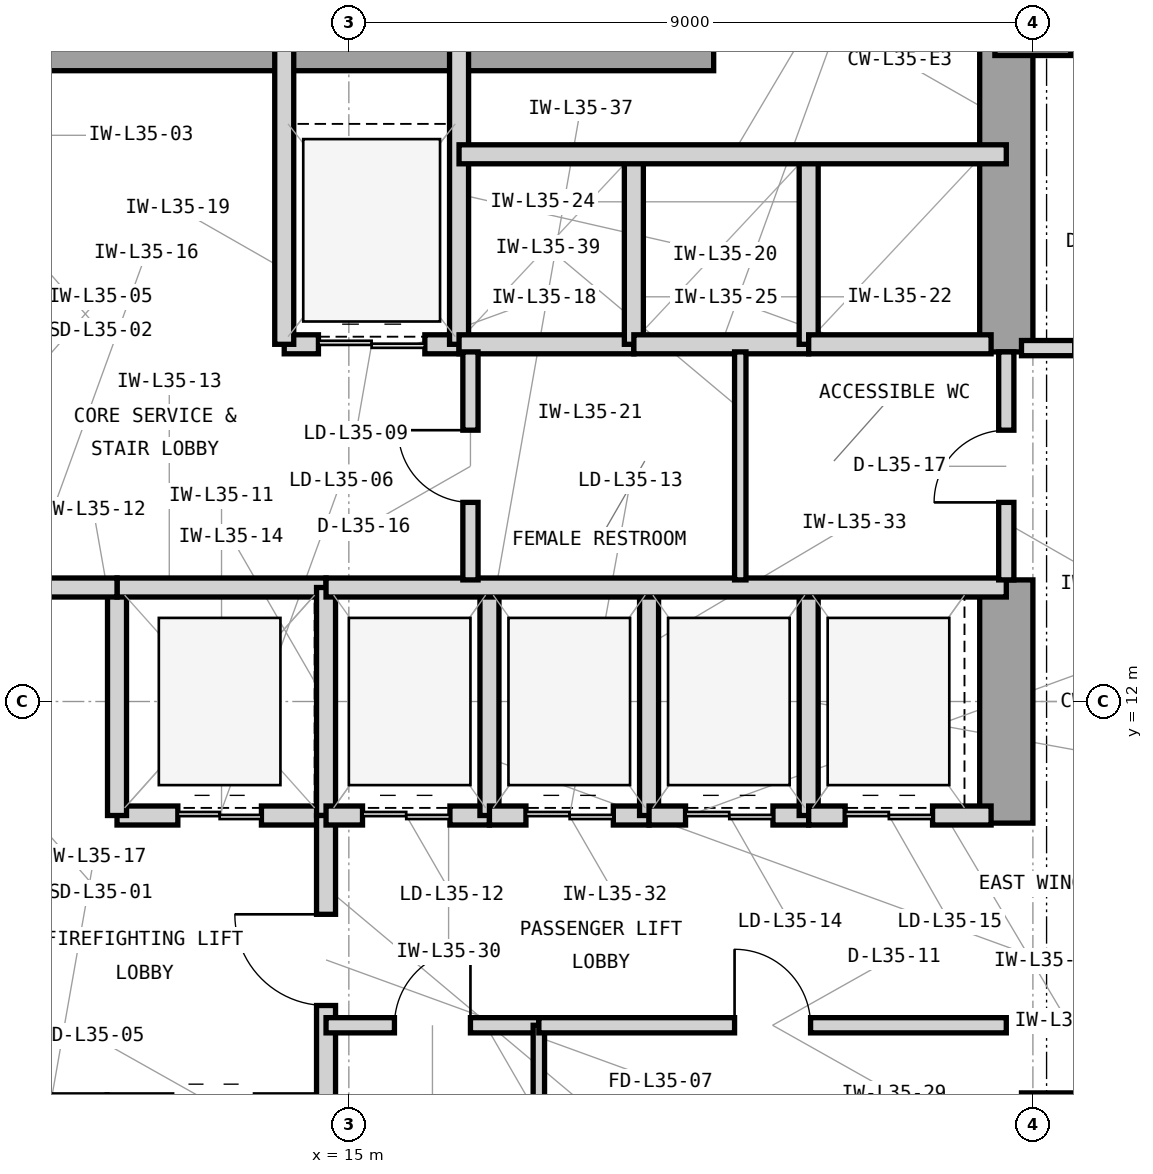
"""IFC4 building model, lengths in metres.
Left out: names, types, materials, properties, quantities, classifications, styles, units other than length and angle.
Written with IfcOpenShell. Run it as: python <this file> out.ifc"""

import sys

from ifc_helpers import new_model, si_unit, direction, frame, frame_2d, origin, origin_2d, place, context, subcontext, project, spatial, rectangle, extrude, element, fill, save


model = new_model("IFC4")
c1 = context("Model", 3, precision=1e-05, world=origin(), true_north=direction((0.0, 1.0)))
c2 = subcontext(c1, "Body", "Model", "MODEL_VIEW")
j1 = project(units=[si_unit("LENGTHUNIT", "METRE"), si_unit("PLANEANGLEUNIT", "RADIAN")], contexts=[c1])
p1 = place(None, origin())
s1 = spatial("IfcSite", under=j1, at=p1, CompositionType="ELEMENT")
p2 = place(p1, origin())
s2 = spatial("IfcBuilding", under=s1, at=p2, CompositionType="ELEMENT")
p3 = place(p2, frame((0.0, 0.0, 147.9)))
s3 = spatial("IfcBuildingStorey", under=s2, at=p3, CompositionType="ELEMENT", Elevation=147.9)
p4 = place(p3, frame((7.475, 20.65, 0.0), z_axis=(0.0, 0.0, 1.0), x_axis=(1.0, 0.0, 0.0)))
e1 = element("IfcWall", 1, at=p4, inside=s3, PredefinedType="SHEAR", context=c2, shape_type="SweptSolid", body=[
    extrude(rectangle(XDim=12.325, YDim=0.7, at=frame_2d((6.163, 0.0))), origin(), (0.0, 0.0, 1.0), 3.9),
])
p5 = place(p3, frame((23.65, 10.4, 0.0), z_axis=(0.0, 0.0, 1.0), x_axis=(0.0, 1.0, 0.0)))
e2 = element("IfcWall", 2, at=p5, inside=s3, PredefinedType="SHEAR", context=c2, shape_type="SweptSolid", body=[
    extrude(rectangle(XDim=3.2, YDim=0.7, at=frame_2d((1.6, 0.0))), origin(), (0.0, 0.0, 1.0), 3.9),
])
p6 = place(p3, frame((23.65, 16.6, 0.0), z_axis=(0.0, 0.0, 1.0), x_axis=(0.0, 1.0, 0.0)))
e3 = element("IfcWall", 3, at=p6, inside=s3, PredefinedType="SHEAR", context=c2, shape_type="SweptSolid", body=[
    extrude(rectangle(XDim=4.05, YDim=0.7, at=frame_2d((2.025, 0.0))), origin(), (0.0, 0.0, 1.0), 3.9),
])
p7 = place(p3, frame((24.0, 21.0, 0.0), z_axis=(0.0, 0.0, 1.0), x_axis=(1.0, 0.0, 0.0)))
e4 = element("IfcColumn", 4, at=p7, inside=s3, PredefinedType="COLUMN", context=c2, shape_type="SweptSolid", body=[
    extrude(rectangle(XDim=1.0, YDim=1.0, at=origin_2d()), origin(), (0.0, 0.0, 1.0), 3.9),
])
p8 = place(p3, frame((11.95, 10.5, 0.0), z_axis=(0.0, 0.0, 1.0), x_axis=(1.0, 0.0, 0.0)))
e5 = element("IfcWall", 5, at=p8, inside=s3, PredefinedType="PARTITIONING", context=c2, shape_type="SweptSolid", body=[
    extrude(rectangle(XDim=2.75, YDim=0.25, at=frame_2d((1.375, 0.0))), origin(), (0.0, 0.0, 1.0), 3.233),
])
p9 = place(p8, frame((0.8, 0.0, 0.0)))
e6 = element("IfcOpeningElement", 6, at=p9, cuts=e5, PredefinedType="OPENING", context=c2, shape_type="SweptSolid", body=[
    extrude(rectangle(XDim=1.1, YDim=2.25, at=frame_2d((0.55, 1.125))), frame((0.0, 0.135, 0.0), z_axis=(0.0, -1.0, 0.0), x_axis=(1.0, 0.0, 0.0)), (0.0, 0.0, 1.0), 0.27),
])
p10 = place(p3, frame((11.95, 10.5, 0.0), z_axis=(0.0, 0.0, 1.0), x_axis=(0.0, 1.0, 0.0)))
e7 = element("IfcWall", 7, at=p10, inside=s3, PredefinedType="PARTITIONING", context=c2, shape_type="SweptSolid", body=[
    extrude(rectangle(XDim=3.0, YDim=0.25, at=frame_2d((1.5, 0.0))), origin(), (0.0, 0.0, 1.0), 3.69),
])
p11 = place(p3, frame((11.95, 13.5, 0.0), z_axis=(0.0, 0.0, 1.0), x_axis=(1.0, 0.0, 0.0)))
e8 = element("IfcWall", 8, at=p11, inside=s3, PredefinedType="PARTITIONING", context=c2, shape_type="SweptSolid", body=[
    extrude(rectangle(XDim=2.75, YDim=0.25, at=frame_2d((1.375, 0.0))), origin(), (0.0, 0.0, 1.0), 3.233),
])
p12 = place(p3, frame((14.7, 10.5, 0.0), z_axis=(0.0, 0.0, 1.0), x_axis=(0.0, 1.0, 0.0)))
e9 = element("IfcWall", 9, at=p12, inside=s3, PredefinedType="PARTITIONING", context=c2, shape_type="SweptSolid", body=[
    extrude(rectangle(XDim=3.0, YDim=0.25, at=frame_2d((1.5, 0.0))), origin(), (0.0, 0.0, 1.0), 3.69),
])
p13 = place(p3, frame((14.7, 6.7, 0.0), z_axis=(0.0, 0.0, 1.0), x_axis=(0.0, 1.0, 0.0)))
e10 = element("IfcWall", 10, at=p13, inside=s3, PredefinedType="PARTITIONING", context=c2, shape_type="SweptSolid", body=[
    extrude(rectangle(XDim=3.8, YDim=0.25, at=frame_2d((1.9, 0.0))), origin(), (0.0, 0.0, 1.0), 3.69),
])
p14 = place(p13, frame((1.3, 0.0, 0.0)))
e11 = element("IfcOpeningElement", 11, at=p14, cuts=e10, PredefinedType="OPENING", context=c2, shape_type="SweptSolid", body=[
    extrude(rectangle(XDim=1.2, YDim=2.2, at=frame_2d((0.6, 1.1))), frame((0.0, 0.135, 0.0), z_axis=(0.0, -1.0, 0.0), x_axis=(1.0, 0.0, 0.0)), (0.0, 0.0, 1.0), 0.27),
])
p15 = place(p3, frame((10.33, 13.5, 0.0), z_axis=(0.0, 0.0, 1.0), x_axis=(1.0, 0.0, 0.0)))
e12 = element("IfcWall", 12, at=p15, inside=s3, PredefinedType="PARTITIONING", context=c2, shape_type="SweptSolid", body=[
    extrude(rectangle(XDim=1.62, YDim=0.25, at=frame_2d((0.81, 0.0))), origin(), (0.0, 0.0, 1.0), 3.233),
])
p16 = place(p3, frame((14.15, 16.7, 0.0), z_axis=(0.0, 0.0, 1.0), x_axis=(1.0, 0.0, 0.0)))
e13 = element("IfcWall", 13, at=p16, inside=s3, PredefinedType="PARTITIONING", context=c2, shape_type="SweptSolid", body=[
    extrude(rectangle(XDim=2.3, YDim=0.25, at=frame_2d((1.15, 0.0))), origin(), (0.0, 0.0, 1.0), 3.233),
])
p17 = place(p16, frame((0.45, 0.0, 0.0)))
e14 = element("IfcOpeningElement", 14, at=p17, cuts=e13, PredefinedType="OPENING", context=c2, shape_type="SweptSolid", body=[
    extrude(rectangle(XDim=1.4, YDim=2.35, at=frame_2d((0.7, 1.175))), frame((0.0, 0.135, 0.0), z_axis=(0.0, -1.0, 0.0), x_axis=(1.0, 0.0, 0.0)), (0.0, 0.0, 1.0), 0.27),
])
for number, where, z_axis, x_axis in (
    (15, (14.15, 16.7, 0.0), (0.0, 0.0, 1.0), (0.0, 1.0, 0.0)),
    (16, (16.45, 16.7, 0.0), (0.0, 0.0, 1.0), (0.0, 1.0, 0.0)),
):
    element("IfcWall", number, at=place(p3, frame(where, z_axis=z_axis, x_axis=x_axis)), inside=s3, PredefinedType="PARTITIONING", context=c2, shape_type="SweptSolid", body=[
        extrude(rectangle(XDim=3.95, YDim=0.25, at=frame_2d((1.975, 0.0))), origin(), (0.0, 0.0, 1.0), 3.69),
    ])
p18 = place(p3, frame((16.45, 16.7, 0.0), z_axis=(0.0, 0.0, 1.0), x_axis=(1.0, 0.0, 0.0)))
e17 = element("IfcWall", 17, at=p18, inside=s3, PredefinedType="PARTITIONING", context=c2, shape_type="SweptSolid", body=[
    extrude(rectangle(XDim=2.3, YDim=0.25, at=frame_2d((1.15, 0.0))), origin(), (0.0, 0.0, 1.0), 3.233),
])
p19 = place(p3, frame((18.75, 16.7, 0.0), z_axis=(0.0, 0.0, 1.0), x_axis=(0.0, 1.0, 0.0)))
e18 = element("IfcWall", 18, at=p19, inside=s3, PredefinedType="PARTITIONING", context=c2, shape_type="SweptSolid", body=[
    extrude(rectangle(XDim=2.5, YDim=0.25, at=frame_2d((1.25, 0.0))), origin(), (0.0, 0.0, 1.0), 3.69),
])
p20 = place(p3, frame((18.75, 16.7, 0.0), z_axis=(0.0, 0.0, 1.0), x_axis=(1.0, 0.0, 0.0)))
e19 = element("IfcWall", 19, at=p20, inside=s3, PredefinedType="PARTITIONING", context=c2, shape_type="SweptSolid", body=[
    extrude(rectangle(XDim=2.3, YDim=0.25, at=frame_2d((1.15, 0.0))), origin(), (0.0, 0.0, 1.0), 3.233),
])
p21 = place(p3, frame((21.05, 16.7, 0.0), z_axis=(0.0, 0.0, 1.0), x_axis=(0.0, 1.0, 0.0)))
e20 = element("IfcWall", 20, at=p21, inside=s3, PredefinedType="PARTITIONING", context=c2, shape_type="SweptSolid", body=[
    extrude(rectangle(XDim=2.5, YDim=0.25, at=frame_2d((1.25, 0.0))), origin(), (0.0, 0.0, 1.0), 3.69),
])
p22 = place(p3, frame((21.05, 16.7, 0.0), z_axis=(0.0, 0.0, 1.0), x_axis=(1.0, 0.0, 0.0)))
e21 = element("IfcWall", 21, at=p22, inside=s3, PredefinedType="PARTITIONING", context=c2, shape_type="SweptSolid", body=[
    extrude(rectangle(XDim=2.4, YDim=0.25, at=frame_2d((1.2, 0.0))), origin(), (0.0, 0.0, 1.0), 3.233),
])
p23 = place(p3, frame((16.45, 19.2, 0.0), z_axis=(0.0, 0.0, 1.0), x_axis=(1.0, 0.0, 0.0)))
e22 = element("IfcWall", 22, at=p23, inside=s3, PredefinedType="PARTITIONING", context=c2, shape_type="SweptSolid", body=[
    extrude(rectangle(XDim=7.2, YDim=0.25, at=frame_2d((3.6, 0.0))), origin(), (0.0, 0.0, 1.0), 3.69),
])
p24 = place(p3, frame((14.7, 7.74, 0.0), z_axis=(0.0, 0.0, 1.0), x_axis=(1.0, 0.0, 0.0)))
e23 = element("IfcWall", 23, at=p24, inside=s3, PredefinedType="PARTITIONING", context=c2, shape_type="SweptSolid", body=[
    extrude(rectangle(XDim=2.8, YDim=0.2, at=frame_2d((1.4, 0.0))), origin(), (0.0, 0.0, 1.0), 3.69),
])
p25 = place(p24, frame((0.9, 0.0, 0.0)))
e24 = element("IfcOpeningElement", 24, at=p25, cuts=e23, PredefinedType="OPENING", context=c2, shape_type="SweptSolid", body=[
    extrude(rectangle(XDim=1.0, YDim=2.15, at=frame_2d((0.5, 1.075))), frame((0.0, 0.11, 0.0), z_axis=(0.0, -1.0, 0.0), x_axis=(1.0, 0.0, 0.0)), (0.0, 0.0, 1.0), 0.22),
])
p26 = place(p3, frame((17.5, 3.35, 0.0), z_axis=(0.0, 0.0, 1.0), x_axis=(0.0, 1.0, 0.0)))
e25 = element("IfcWall", 25, at=p26, inside=s3, PredefinedType="PARTITIONING", context=c2, shape_type="SweptSolid", body=[
    extrude(rectangle(XDim=4.39, YDim=0.15, at=frame_2d((2.195, 0.0))), origin(), (0.0, 0.0, 1.0), 3.69),
])
p27 = place(p3, frame((17.5, 7.74, 0.0), z_axis=(0.0, 0.0, 1.0), x_axis=(1.0, 0.0, 0.0)))
e26 = element("IfcWall", 26, at=p27, inside=s3, PredefinedType="PARTITIONING", context=c2, shape_type="SweptSolid", body=[
    extrude(rectangle(XDim=6.15, YDim=0.2, at=frame_2d((3.075, 0.0))), origin(), (0.0, 0.0, 1.0), 3.69),
])
p28 = place(p27, frame((2.575, 0.0, 0.0)))
e27 = element("IfcOpeningElement", 27, at=p28, cuts=e26, PredefinedType="OPENING", context=c2, shape_type="SweptSolid", body=[
    extrude(rectangle(XDim=1.0, YDim=2.15, at=frame_2d((0.5, 1.075))), frame((0.0, 0.11, 0.0), z_axis=(0.0, -1.0, 0.0), x_axis=(1.0, 0.0, 0.0)), (0.0, 0.0, 1.0), 0.22),
])
p29 = place(p3, frame((14.7, 10.5, 0.0), z_axis=(0.0, 0.0, 1.0), x_axis=(1.0, 0.0, 0.0)))
e28 = element("IfcWall", 28, at=p29, inside=s3, PredefinedType="PARTITIONING", context=c2, shape_type="SweptSolid", body=[
    extrude(rectangle(XDim=2.15, YDim=0.25, at=frame_2d((1.075, 0.0))), origin(), (0.0, 0.0, 1.0), 3.233),
])
p30 = place(p29, frame((0.48, 0.0, 0.0)))
e29 = element("IfcOpeningElement", 29, at=p30, cuts=e28, PredefinedType="OPENING", context=c2, shape_type="SweptSolid", body=[
    extrude(rectangle(XDim=1.15, YDim=2.25, at=frame_2d((0.575, 1.125))), frame((0.0, 0.135, 0.0), z_axis=(0.0, -1.0, 0.0), x_axis=(1.0, 0.0, 0.0)), (0.0, 0.0, 1.0), 0.27),
])
p31 = place(p3, frame((16.85, 10.5, 0.0), z_axis=(0.0, 0.0, 1.0), x_axis=(0.0, 1.0, 0.0)))
e30 = element("IfcWall", 30, at=p31, inside=s3, PredefinedType="PARTITIONING", context=c2, shape_type="SweptSolid", body=[
    extrude(rectangle(XDim=3.0, YDim=0.25, at=frame_2d((1.5, 0.0))), origin(), (0.0, 0.0, 1.0), 3.69),
])
p32 = place(p3, frame((16.85, 10.5, 0.0), z_axis=(0.0, 0.0, 1.0), x_axis=(1.0, 0.0, 0.0)))
e31 = element("IfcWall", 31, at=p32, inside=s3, PredefinedType="PARTITIONING", context=c2, shape_type="SweptSolid", body=[
    extrude(rectangle(XDim=2.1, YDim=0.25, at=frame_2d((1.05, 0.0))), origin(), (0.0, 0.0, 1.0), 3.233),
])
p33 = place(p32, frame((0.48, 0.0, 0.0)))
e32 = element("IfcOpeningElement", 32, at=p33, cuts=e31, PredefinedType="OPENING", context=c2, shape_type="SweptSolid", body=[
    extrude(rectangle(XDim=1.15, YDim=2.25, at=frame_2d((0.575, 1.125))), frame((0.0, 0.135, 0.0), z_axis=(0.0, -1.0, 0.0), x_axis=(1.0, 0.0, 0.0)), (0.0, 0.0, 1.0), 0.27),
])
p34 = place(p3, frame((18.95, 10.5, 0.0), z_axis=(0.0, 0.0, 1.0), x_axis=(0.0, 1.0, 0.0)))
e33 = element("IfcWall", 33, at=p34, inside=s3, PredefinedType="PARTITIONING", context=c2, shape_type="SweptSolid", body=[
    extrude(rectangle(XDim=3.0, YDim=0.25, at=frame_2d((1.5, 0.0))), origin(), (0.0, 0.0, 1.0), 3.69),
])
p35 = place(p3, frame((18.95, 10.5, 0.0), z_axis=(0.0, 0.0, 1.0), x_axis=(1.0, 0.0, 0.0)))
e34 = element("IfcWall", 34, at=p35, inside=s3, PredefinedType="PARTITIONING", context=c2, shape_type="SweptSolid", body=[
    extrude(rectangle(XDim=2.1, YDim=0.25, at=frame_2d((1.05, 0.0))), origin(), (0.0, 0.0, 1.0), 3.233),
])
p36 = place(p35, frame((0.48, 0.0, 0.0)))
e35 = element("IfcOpeningElement", 35, at=p36, cuts=e34, PredefinedType="OPENING", context=c2, shape_type="SweptSolid", body=[
    extrude(rectangle(XDim=1.15, YDim=2.25, at=frame_2d((0.575, 1.125))), frame((0.0, 0.135, 0.0), z_axis=(0.0, -1.0, 0.0), x_axis=(1.0, 0.0, 0.0)), (0.0, 0.0, 1.0), 0.27),
])
p37 = place(p3, frame((21.05, 10.5, 0.0), z_axis=(0.0, 0.0, 1.0), x_axis=(0.0, 1.0, 0.0)))
e36 = element("IfcWall", 36, at=p37, inside=s3, PredefinedType="PARTITIONING", context=c2, shape_type="SweptSolid", body=[
    extrude(rectangle(XDim=3.0, YDim=0.25, at=frame_2d((1.5, 0.0))), origin(), (0.0, 0.0, 1.0), 3.69),
])
p38 = place(p3, frame((21.05, 10.5, 0.0), z_axis=(0.0, 0.0, 1.0), x_axis=(1.0, 0.0, 0.0)))
e37 = element("IfcWall", 37, at=p38, inside=s3, PredefinedType="PARTITIONING", context=c2, shape_type="SweptSolid", body=[
    extrude(rectangle(XDim=2.4, YDim=0.25, at=frame_2d((1.2, 0.0))), origin(), (0.0, 0.0, 1.0), 3.233),
])
p39 = place(p38, frame((0.48, 0.0, 0.0)))
e38 = element("IfcOpeningElement", 38, at=p39, cuts=e37, PredefinedType="OPENING", context=c2, shape_type="SweptSolid", body=[
    extrude(rectangle(XDim=1.15, YDim=2.25, at=frame_2d((0.575, 1.125))), frame((0.0, 0.135, 0.0), z_axis=(0.0, -1.0, 0.0), x_axis=(1.0, 0.0, 0.0)), (0.0, 0.0, 1.0), 0.27),
])
p40 = place(p3, frame((14.7, 13.5, 0.0), z_axis=(0.0, 0.0, 1.0), x_axis=(1.0, 0.0, 0.0)))
e39 = element("IfcWall", 39, at=p40, inside=s3, PredefinedType="PARTITIONING", context=c2, shape_type="SweptSolid", body=[
    extrude(rectangle(XDim=8.95, YDim=0.25, at=frame_2d((4.475, 0.0))), origin(), (0.0, 0.0, 1.0), 3.233),
])
p41 = place(p3, frame((16.6, 13.6, 0.0), z_axis=(0.0, 0.0, 1.0), x_axis=(0.0, 1.0, 0.0)))
e40 = element("IfcWall", 40, at=p41, inside=s3, PredefinedType="PARTITIONING", context=c2, shape_type="SweptSolid", body=[
    extrude(rectangle(XDim=3.0, YDim=0.2, at=frame_2d((1.5, 0.0))), origin(), (0.0, 0.0, 1.0), 3.69),
])
p42 = place(p41, frame((1.02, 0.0, 0.0)))
e41 = element("IfcOpeningElement", 41, at=p42, cuts=e40, PredefinedType="OPENING", context=c2, shape_type="SweptSolid", body=[
    extrude(rectangle(XDim=0.95, YDim=2.1, at=frame_2d((0.475, 1.05))), frame((0.0, 0.11, 0.0), z_axis=(0.0, -1.0, 0.0), x_axis=(1.0, 0.0, 0.0)), (0.0, 0.0, 1.0), 0.22),
])
p43 = place(p3, frame((20.15, 13.6, 0.0), z_axis=(0.0, 0.0, 1.0), x_axis=(0.0, 1.0, 0.0)))
e42 = element("IfcWall", 42, at=p43, inside=s3, PredefinedType="PARTITIONING", context=c2, shape_type="SweptSolid", body=[
    extrude(rectangle(XDim=3.0, YDim=0.15, at=frame_2d((1.5, 0.0))), origin(), (0.0, 0.0, 1.0), 3.69),
])
p44 = place(p3, frame((23.65, 13.6, 0.0), z_axis=(0.0, 0.0, 1.0), x_axis=(0.0, 1.0, 0.0)))
e43 = element("IfcWall", 43, at=p44, inside=s3, PredefinedType="PARTITIONING", context=c2, shape_type="SweptSolid", body=[
    extrude(rectangle(XDim=3.0, YDim=0.2, at=frame_2d((1.5, 0.0))), origin(), (0.0, 0.0, 1.0), 3.69),
])
p45 = place(p44, frame((1.02, 0.0, 0.0)))
e44 = element("IfcOpeningElement", 44, at=p45, cuts=e43, PredefinedType="OPENING", context=c2, shape_type="SweptSolid", body=[
    extrude(rectangle(XDim=0.95, YDim=2.1, at=frame_2d((0.475, 1.05))), frame((0.0, 0.11, 0.0), z_axis=(0.0, -1.0, 0.0), x_axis=(1.0, 0.0, 0.0)), (0.0, 0.0, 1.0), 0.22),
])
p46 = place(p3, frame((23.85, 6.75, 0.0), z_axis=(0.0, 0.0, 1.0), x_axis=(1.0, 0.0, 0.0)))
e45 = element("IfcWall", 45, at=p46, inside=s3, PredefinedType="PARTITIONING", context=c2, shape_type="SweptSolid", body=[
    extrude(rectangle(XDim=2.85, YDim=0.2, at=frame_2d((1.425, 0.0))), origin(), (0.0, 0.0, 1.0), 3.69),
])
p47 = place(p46, frame((0.7, 0.0, 0.0)))
e46 = element("IfcOpeningElement", 46, at=p47, cuts=e45, PredefinedType="OPENING", context=c2, shape_type="SweptSolid", body=[
    extrude(rectangle(XDim=1.0, YDim=2.15, at=frame_2d((0.5, 1.075))), frame((0.0, 0.11, 0.0), z_axis=(0.0, -1.0, 0.0), x_axis=(1.0, 0.0, 0.0)), (0.0, 0.0, 1.0), 0.22),
])
p48 = place(p3, frame((23.85, 16.65, 0.0), z_axis=(0.0, 0.0, 1.0), x_axis=(1.0, 0.0, 0.0)))
e47 = element("IfcWall", 47, at=p48, inside=s3, PredefinedType="PARTITIONING", context=c2, shape_type="SweptSolid", body=[
    extrude(rectangle(XDim=2.85, YDim=0.2, at=frame_2d((1.425, 0.0))), origin(), (0.0, 0.0, 1.0), 3.69),
])
p49 = place(p48, frame((0.7, 0.0, 0.0)))
e48 = element("IfcOpeningElement", 48, at=p49, cuts=e47, PredefinedType="OPENING", context=c2, shape_type="SweptSolid", body=[
    extrude(rectangle(XDim=1.0, YDim=2.15, at=frame_2d((0.5, 1.075))), frame((0.0, 0.11, 0.0), z_axis=(0.0, -1.0, 0.0), x_axis=(1.0, 0.0, 0.0)), (0.0, 0.0, 1.0), 0.22),
])
p50 = place(p9, origin())
e49 = element("IfcDoor", 49, at=p50, inside=s3, OperationType="DOUBLE_DOOR_SLIDING", PredefinedType="DOOR", context=c2, shape_type="SweptSolid", body=[
    extrude(rectangle(XDim=1.1, YDim=2.25, at=frame_2d((0.55, 1.125))), frame((0.0, 0.025, 0.0), z_axis=(0.0, -1.0, 0.0), x_axis=(1.0, 0.0, 0.0)), (0.0, 0.0, 1.0), 0.05),
])
fill(e6, e49)
p51 = place(p14, origin())
e50 = element("IfcDoor", 50, at=p51, inside=s3, OperationType="SINGLE_SWING_RIGHT", PredefinedType="DOOR", context=c2, shape_type="SweptSolid", body=[
    extrude(rectangle(XDim=1.2, YDim=2.2, at=frame_2d((0.6, 1.1))), frame((0.0, 0.025, 0.0), z_axis=(0.0, -1.0, 0.0), x_axis=(1.0, 0.0, 0.0)), (0.0, 0.0, 1.0), 0.05),
])
fill(e11, e50)
p52 = place(p17, origin())
e51 = element("IfcDoor", 51, at=p52, inside=s3, OperationType="DOUBLE_DOOR_SLIDING", PredefinedType="DOOR", context=c2, shape_type="SweptSolid", body=[
    extrude(rectangle(XDim=1.4, YDim=2.35, at=frame_2d((0.7, 1.175))), frame((0.0, 0.025, 0.0), z_axis=(0.0, -1.0, 0.0), x_axis=(1.0, 0.0, 0.0)), (0.0, 0.0, 1.0), 0.05),
])
fill(e14, e51)
p53 = place(p25, origin())
e52 = element("IfcDoor", 52, at=p53, inside=s3, OperationType="SINGLE_SWING_RIGHT", PredefinedType="DOOR", context=c2, shape_type="SweptSolid", body=[
    extrude(rectangle(XDim=1.0, YDim=2.15, at=frame_2d((0.5, 1.075))), frame((0.0, 0.025, 0.0), z_axis=(0.0, -1.0, 0.0), x_axis=(1.0, 0.0, 0.0)), (0.0, 0.0, 1.0), 0.05),
])
fill(e24, e52)
p54 = place(p28, origin())
e53 = element("IfcDoor", 53, at=p54, inside=s3, OperationType="SINGLE_SWING_LEFT", PredefinedType="DOOR", context=c2, shape_type="SweptSolid", body=[
    extrude(rectangle(XDim=1.0, YDim=2.15, at=frame_2d((0.5, 1.075))), frame((0.0, 0.025, 0.0), z_axis=(0.0, -1.0, 0.0), x_axis=(1.0, 0.0, 0.0)), (0.0, 0.0, 1.0), 0.05),
])
fill(e27, e53)
p55 = place(p30, origin())
e54 = element("IfcDoor", 54, at=p55, inside=s3, OperationType="DOUBLE_DOOR_SLIDING", PredefinedType="DOOR", context=c2, shape_type="SweptSolid", body=[
    extrude(rectangle(XDim=1.15, YDim=2.25, at=frame_2d((0.575, 1.125))), frame((0.0, 0.025, 0.0), z_axis=(0.0, -1.0, 0.0), x_axis=(1.0, 0.0, 0.0)), (0.0, 0.0, 1.0), 0.05),
])
fill(e29, e54)
p56 = place(p33, origin())
e55 = element("IfcDoor", 55, at=p56, inside=s3, OperationType="DOUBLE_DOOR_SLIDING", PredefinedType="DOOR", context=c2, shape_type="SweptSolid", body=[
    extrude(rectangle(XDim=1.15, YDim=2.25, at=frame_2d((0.575, 1.125))), frame((0.0, 0.025, 0.0), z_axis=(0.0, -1.0, 0.0), x_axis=(1.0, 0.0, 0.0)), (0.0, 0.0, 1.0), 0.05),
])
fill(e32, e55)
p57 = place(p36, origin())
e56 = element("IfcDoor", 56, at=p57, inside=s3, OperationType="DOUBLE_DOOR_SLIDING", PredefinedType="DOOR", context=c2, shape_type="SweptSolid", body=[
    extrude(rectangle(XDim=1.15, YDim=2.25, at=frame_2d((0.575, 1.125))), frame((0.0, 0.025, 0.0), z_axis=(0.0, -1.0, 0.0), x_axis=(1.0, 0.0, 0.0)), (0.0, 0.0, 1.0), 0.05),
])
fill(e35, e56)
p58 = place(p39, origin())
e57 = element("IfcDoor", 57, at=p58, inside=s3, OperationType="DOUBLE_DOOR_SLIDING", PredefinedType="DOOR", context=c2, shape_type="SweptSolid", body=[
    extrude(rectangle(XDim=1.15, YDim=2.25, at=frame_2d((0.575, 1.125))), frame((0.0, 0.025, 0.0), z_axis=(0.0, -1.0, 0.0), x_axis=(1.0, 0.0, 0.0)), (0.0, 0.0, 1.0), 0.05),
])
fill(e38, e57)
p59 = place(p42, origin())
e58 = element("IfcDoor", 58, at=p59, inside=s3, OperationType="SINGLE_SWING_RIGHT", PredefinedType="DOOR", context=c2, shape_type="SweptSolid", body=[
    extrude(rectangle(XDim=0.95, YDim=2.1, at=frame_2d((0.475, 1.05))), frame((0.0, 0.025, 0.0), z_axis=(0.0, -1.0, 0.0), x_axis=(1.0, 0.0, 0.0)), (0.0, 0.0, 1.0), 0.05),
])
fill(e41, e58)
p60 = place(p45, origin())
e59 = element("IfcDoor", 59, at=p60, inside=s3, OperationType="SINGLE_SWING_LEFT", PredefinedType="DOOR", context=c2, shape_type="SweptSolid", body=[
    extrude(rectangle(XDim=0.95, YDim=2.1, at=frame_2d((0.475, 1.05))), frame((0.0, 0.025, 0.0), z_axis=(0.0, -1.0, 0.0), x_axis=(1.0, 0.0, 0.0)), (0.0, 0.0, 1.0), 0.05),
])
fill(e44, e59)
save(model, sys.argv[1])
